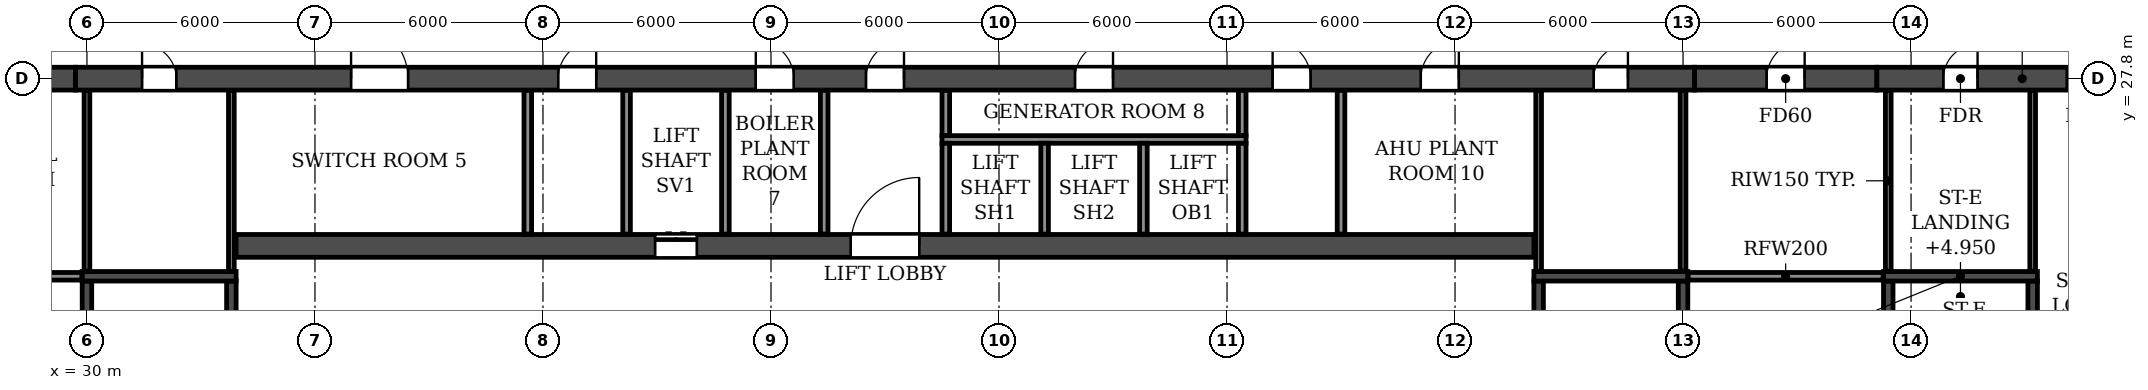
"""IFC4 building model, lengths in metres.
Left out: names, types, materials, properties, quantities, classifications, styles, units other than length and angle.
Written with IfcOpenShell. Run it as: python <this file> out.ifc"""

import sys

from ifc_helpers import new_model, si_unit, direction, frame, frame_2d, origin, place, context, subcontext, project, spatial, rectangle, extrude, element, fill, save


model = new_model("IFC4")
c1 = context("Model", 3, precision=1e-05, world=origin(), true_north=direction((0.0, 1.0)))
c2 = subcontext(c1, "Body", "Model", "MODEL_VIEW")
j1 = project(units=[si_unit("LENGTHUNIT", "METRE"), si_unit("PLANEANGLEUNIT", "RADIAN")], contexts=[c1])
p1 = place(None, origin())
s1 = spatial("IfcSite", under=j1, at=p1, CompositionType="ELEMENT")
p2 = place(p1, origin())
s2 = spatial("IfcBuilding", under=s1, at=p2, CompositionType="ELEMENT")
p3 = place(p2, frame((0.0, 0.0, 66.3)))
s3 = spatial("IfcBuildingStorey", under=s2, at=p3, CompositionType="ELEMENT", Elevation=66.3)
p4 = place(p3, frame((24.9, 27.8, 0.0), z_axis=(0.0, 0.0, 1.0), x_axis=(1.0, 0.0, 0.0)))
e1 = element("IfcWall", 1, at=p4, inside=s3, PredefinedType="SHEAR", context=c2, shape_type="SweptSolid", body=[
    extrude(rectangle(XDim=4.8, YDim=0.6, at=frame_2d((2.4, 0.0))), origin(), (0.0, 0.0, 1.0), 6.36),
])
p5 = place(p4, frame((1.9, 0.0, 0.0)))
e2 = element("IfcOpeningElement", 2, at=p5, cuts=e1, PredefinedType="OPENING", context=c2, shape_type="SweptSolid", body=[
    extrude(rectangle(XDim=1.0, YDim=2.1, at=frame_2d((0.5, 1.05))), frame((0.0, 0.31, 0.0), z_axis=(0.0, -1.0, 0.0), x_axis=(1.0, 0.0, 0.0)), (0.0, 0.0, 1.0), 0.62),
])
p6 = place(p3, frame((72.3, 27.8, 0.0), z_axis=(0.0, 0.0, 1.0), x_axis=(1.0, 0.0, 0.0)))
e3 = element("IfcWall", 3, at=p6, inside=s3, PredefinedType="SHEAR", context=c2, shape_type="SweptSolid", body=[
    extrude(rectangle(XDim=4.8, YDim=0.6, at=frame_2d((2.4, 0.0))), origin(), (0.0, 0.0, 1.0), 6.36),
])
p7 = place(p6, frame((1.9, 0.0, 0.0)))
e4 = element("IfcOpeningElement", 4, at=p7, cuts=e3, PredefinedType="OPENING", context=c2, shape_type="SweptSolid", body=[
    extrude(rectangle(XDim=1.0, YDim=2.1, at=frame_2d((0.5, 1.05))), frame((0.0, 0.31, 0.0), z_axis=(0.0, -1.0, 0.0), x_axis=(1.0, 0.0, 0.0)), (0.0, 0.0, 1.0), 0.62),
])
p8 = place(p3, frame((29.7, 27.8, 0.0), z_axis=(0.0, 0.0, 1.0), x_axis=(1.0, 0.0, 0.0)))
e5 = element("IfcWall", 5, at=p8, inside=s3, PredefinedType="SOLIDWALL", context=c2, shape_type="SweptSolid", body=[
    extrude(rectangle(XDim=42.6, YDim=0.6, at=frame_2d((21.3, 0.0))), origin(), (0.0, 0.0, 1.0), 6.36),
])
p9 = place(p8, frame((1.75, 0.0, 0.0)))
e6 = element("IfcOpeningElement", 6, at=p9, cuts=e5, PredefinedType="OPENING", context=c2, shape_type="SweptSolid", body=[
    extrude(rectangle(XDim=0.9, YDim=2.1, at=frame_2d((0.45, 1.05))), frame((0.0, 0.31, 0.0), z_axis=(0.0, -1.0, 0.0), x_axis=(1.0, 0.0, 0.0)), (0.0, 0.0, 1.0), 0.62),
])
p10 = place(p8, frame((7.25, 0.0, 0.0)))
e7 = element("IfcOpeningElement", 7, at=p10, cuts=e5, PredefinedType="OPENING", context=c2, shape_type="SweptSolid", body=[
    extrude(rectangle(XDim=1.5, YDim=2.1, at=frame_2d((0.75, 1.05))), frame((0.0, 0.31, 0.0), z_axis=(0.0, -1.0, 0.0), x_axis=(1.0, 0.0, 0.0)), (0.0, 0.0, 1.0), 0.62),
])
p11 = place(p8, frame((12.7, 0.0, 0.0)))
e8 = element("IfcOpeningElement", 8, at=p11, cuts=e5, PredefinedType="OPENING", context=c2, shape_type="SweptSolid", body=[
    extrude(rectangle(XDim=1.0, YDim=2.1, at=frame_2d((0.5, 1.05))), frame((0.0, 0.31, 0.0), z_axis=(0.0, -1.0, 0.0), x_axis=(1.0, 0.0, 0.0)), (0.0, 0.0, 1.0), 0.62),
])
p12 = place(p8, frame((17.9, 0.0, 0.0)))
e9 = element("IfcOpeningElement", 9, at=p12, cuts=e5, PredefinedType="OPENING", context=c2, shape_type="SweptSolid", body=[
    extrude(rectangle(XDim=1.0, YDim=2.1, at=frame_2d((0.5, 1.05))), frame((0.0, 0.31, 0.0), z_axis=(0.0, -1.0, 0.0), x_axis=(1.0, 0.0, 0.0)), (0.0, 0.0, 1.0), 0.62),
])
p13 = place(p8, frame((20.8, 0.0, 0.0)))
e10 = element("IfcOpeningElement", 10, at=p13, cuts=e5, PredefinedType="OPENING", context=c2, shape_type="SweptSolid", body=[
    extrude(rectangle(XDim=1.0, YDim=2.1, at=frame_2d((0.5, 1.05))), frame((0.0, 0.31, 0.0), z_axis=(0.0, -1.0, 0.0), x_axis=(1.0, 0.0, 0.0)), (0.0, 0.0, 1.0), 0.62),
])
p14 = place(p8, frame((26.3, 0.0, 0.0)))
e11 = element("IfcOpeningElement", 11, at=p14, cuts=e5, PredefinedType="OPENING", context=c2, shape_type="SweptSolid", body=[
    extrude(rectangle(XDim=1.0, YDim=2.1, at=frame_2d((0.5, 1.05))), frame((0.0, 0.31, 0.0), z_axis=(0.0, -1.0, 0.0), x_axis=(1.0, 0.0, 0.0)), (0.0, 0.0, 1.0), 0.62),
])
p15 = place(p8, frame((31.5, 0.0, 0.0)))
e12 = element("IfcOpeningElement", 12, at=p15, cuts=e5, PredefinedType="OPENING", context=c2, shape_type="SweptSolid", body=[
    extrude(rectangle(XDim=1.0, YDim=2.1, at=frame_2d((0.5, 1.05))), frame((0.0, 0.31, 0.0), z_axis=(0.0, -1.0, 0.0), x_axis=(1.0, 0.0, 0.0)), (0.0, 0.0, 1.0), 0.62),
])
p16 = place(p8, frame((35.4, 0.0, 0.0)))
e13 = element("IfcOpeningElement", 13, at=p16, cuts=e5, PredefinedType="OPENING", context=c2, shape_type="SweptSolid", body=[
    extrude(rectangle(XDim=1.0, YDim=2.1, at=frame_2d((0.5, 1.05))), frame((0.0, 0.31, 0.0), z_axis=(0.0, -1.0, 0.0), x_axis=(1.0, 0.0, 0.0)), (0.0, 0.0, 1.0), 0.62),
])
p17 = place(p8, frame((39.95, 0.0, 0.0)))
e14 = element("IfcOpeningElement", 14, at=p17, cuts=e5, PredefinedType="OPENING", context=c2, shape_type="SweptSolid", body=[
    extrude(rectangle(XDim=0.9, YDim=2.1, at=frame_2d((0.45, 1.05))), frame((0.0, 0.31, 0.0), z_axis=(0.0, -1.0, 0.0), x_axis=(1.0, 0.0, 0.0)), (0.0, 0.0, 1.0), 0.62),
])
p18 = place(p3, frame((77.1, 27.8, 0.0), z_axis=(0.0, 0.0, 1.0), x_axis=(1.0, 0.0, 0.0)))
e15 = element("IfcWall", 15, at=p18, inside=s3, PredefinedType="SOLIDWALL", context=c2, shape_type="SweptSolid", body=[
    extrude(rectangle(XDim=7.2, YDim=0.6, at=frame_2d((3.6, 0.0))), origin(), (0.0, 0.0, 1.0), 6.36),
])
p19 = place(p18, frame((1.75, 0.0, 0.0)))
e16 = element("IfcOpeningElement", 16, at=p19, cuts=e15, PredefinedType="OPENING", context=c2, shape_type="SweptSolid", body=[
    extrude(rectangle(XDim=0.9, YDim=2.1, at=frame_2d((0.45, 1.05))), frame((0.0, 0.31, 0.0), z_axis=(0.0, -1.0, 0.0), x_axis=(1.0, 0.0, 0.0)), (0.0, 0.0, 1.0), 0.62),
])
p20 = place(p18, frame((5.0, 0.0, 0.0)))
e17 = element("IfcOpeningElement", 17, at=p20, cuts=e15, PredefinedType="OPENING", context=c2, shape_type="SweptSolid", body=[
    extrude(rectangle(XDim=1.0, YDim=2.1, at=frame_2d((0.5, 1.05))), frame((0.0, 0.31, 0.0), z_axis=(0.0, -1.0, 0.0), x_axis=(1.0, 0.0, 0.0)), (0.0, 0.0, 1.0), 0.62),
])
p21 = place(p3, frame((33.925, 23.4, 0.0), z_axis=(0.0, 0.0, 1.0), x_axis=(1.0, 0.0, 0.0)))
e18 = element("IfcWall", 18, at=p21, inside=s3, PredefinedType="SOLIDWALL", context=c2, shape_type="SweptSolid", body=[
    extrude(rectangle(XDim=34.15, YDim=0.6, at=frame_2d((17.075, 0.0))), origin(), (0.0, 0.0, 1.0), 6.36),
])
p22 = place(p21, frame((16.175, 0.0, 0.0)))
e19 = element("IfcOpeningElement", 19, at=p22, cuts=e18, PredefinedType="OPENING", context=c2, shape_type="SweptSolid", body=[
    extrude(rectangle(XDim=1.8, YDim=2.1, at=frame_2d((0.9, 1.05))), frame((0.0, 0.31, 0.0), z_axis=(0.0, -1.0, 0.0), x_axis=(1.0, 0.0, 0.0)), (0.0, 0.0, 1.0), 0.62),
])
p23 = place(p21, frame((11.025, 0.0, 0.0)))
e20 = element("IfcOpeningElement", 20, at=p23, cuts=e18, PredefinedType="OPENING", context=c2, shape_type="SweptSolid", body=[
    extrude(rectangle(XDim=1.1, YDim=2.1, at=frame_2d((0.55, 1.05))), frame((0.0, 0.31, 0.0), z_axis=(0.0, -1.0, 0.0), x_axis=(1.0, 0.0, 0.0)), (0.0, 0.0, 1.0), 0.62),
])
p24 = place(p3, frame((30.0, 14.9, 0.0), z_axis=(0.0, 0.0, 1.0), x_axis=(0.0, 1.0, 0.0)))
e21 = element("IfcWall", 21, at=p24, inside=s3, PredefinedType="SOLIDWALL", context=c2, shape_type="SweptSolid", body=[
    extrude(rectangle(XDim=7.575, YDim=0.25, at=frame_2d((3.788, 0.0))), origin(), (0.0, 0.0, 1.0), 6.36),
])
p25 = place(p3, frame((33.8, 14.9, 0.0), z_axis=(0.0, 0.0, 1.0), x_axis=(0.0, 1.0, 0.0)))
e22 = element("IfcWall", 22, at=p25, inside=s3, PredefinedType="SOLIDWALL", context=c2, shape_type="SweptSolid", body=[
    extrude(rectangle(XDim=7.575, YDim=0.25, at=frame_2d((3.788, 0.0))), origin(), (0.0, 0.0, 1.0), 6.36),
])
p26 = place(p25, frame((0.4, 0.0, 0.0)))
e23 = element("IfcOpeningElement", 23, at=p26, cuts=e22, PredefinedType="OPENING", context=c2, shape_type="SweptSolid", body=[
    extrude(rectangle(XDim=1.0, YDim=2.1, at=frame_2d((0.5, 1.05))), frame((0.0, 0.135, 0.0), z_axis=(0.0, -1.0, 0.0), x_axis=(1.0, 0.0, 0.0)), (0.0, 0.0, 1.0), 0.27),
])
p27 = place(p3, frame((29.875, 22.6, 0.0), z_axis=(0.0, 0.0, 1.0), x_axis=(1.0, 0.0, 0.0)))
e24 = element("IfcWall", 24, at=p27, inside=s3, PredefinedType="SOLIDWALL", context=c2, shape_type="SweptSolid", body=[
    extrude(rectangle(XDim=4.05, YDim=0.25, at=frame_2d((2.025, 0.0))), origin(), (0.0, 0.0, 1.0), 6.36),
])
p28 = place(p3, frame((68.2, 14.9, 0.0), z_axis=(0.0, 0.0, 1.0), x_axis=(0.0, 1.0, 0.0)))
e25 = element("IfcWall", 25, at=p28, inside=s3, PredefinedType="SOLIDWALL", context=c2, shape_type="SweptSolid", body=[
    extrude(rectangle(XDim=7.575, YDim=0.25, at=frame_2d((3.788, 0.0))), origin(), (0.0, 0.0, 1.0), 6.36),
])
p29 = place(p28, frame((0.4, 0.0, 0.0)))
e26 = element("IfcOpeningElement", 26, at=p29, cuts=e25, PredefinedType="OPENING", context=c2, shape_type="SweptSolid", body=[
    extrude(rectangle(XDim=1.0, YDim=2.1, at=frame_2d((0.5, 1.05))), frame((0.0, 0.135, 0.0), z_axis=(0.0, -1.0, 0.0), x_axis=(1.0, 0.0, 0.0)), (0.0, 0.0, 1.0), 0.27),
])
p30 = place(p3, frame((72.0, 14.9, 0.0), z_axis=(0.0, 0.0, 1.0), x_axis=(0.0, 1.0, 0.0)))
e27 = element("IfcWall", 27, at=p30, inside=s3, PredefinedType="SOLIDWALL", context=c2, shape_type="SweptSolid", body=[
    extrude(rectangle(XDim=7.575, YDim=0.25, at=frame_2d((3.788, 0.0))), origin(), (0.0, 0.0, 1.0), 6.36),
])
p31 = place(p3, frame((68.075, 22.6, 0.0), z_axis=(0.0, 0.0, 1.0), x_axis=(1.0, 0.0, 0.0)))
e28 = element("IfcWall", 28, at=p31, inside=s3, PredefinedType="SOLIDWALL", context=c2, shape_type="SweptSolid", body=[
    extrude(rectangle(XDim=4.05, YDim=0.25, at=frame_2d((2.025, 0.0))), origin(), (0.0, 0.0, 1.0), 6.36),
])
p32 = place(p3, frame((77.4, 14.9, 0.0), z_axis=(0.0, 0.0, 1.0), x_axis=(0.0, 1.0, 0.0)))
e29 = element("IfcWall", 29, at=p32, inside=s3, PredefinedType="SOLIDWALL", context=c2, shape_type="SweptSolid", body=[
    extrude(rectangle(XDim=7.575, YDim=0.25, at=frame_2d((3.788, 0.0))), origin(), (0.0, 0.0, 1.0), 6.36),
])
p33 = place(p32, frame((0.4, 0.0, 0.0)))
e30 = element("IfcOpeningElement", 30, at=p33, cuts=e29, PredefinedType="OPENING", context=c2, shape_type="SweptSolid", body=[
    extrude(rectangle(XDim=1.0, YDim=2.1, at=frame_2d((0.5, 1.05))), frame((0.0, 0.135, 0.0), z_axis=(0.0, -1.0, 0.0), x_axis=(1.0, 0.0, 0.0)), (0.0, 0.0, 1.0), 0.27),
])
p34 = place(p3, frame((81.2, 14.9, 0.0), z_axis=(0.0, 0.0, 1.0), x_axis=(0.0, 1.0, 0.0)))
e31 = element("IfcWall", 31, at=p34, inside=s3, PredefinedType="SOLIDWALL", context=c2, shape_type="SweptSolid", body=[
    extrude(rectangle(XDim=7.575, YDim=0.25, at=frame_2d((3.788, 0.0))), origin(), (0.0, 0.0, 1.0), 6.36),
])
p35 = place(p34, frame((0.4, 0.0, 0.0)))
e32 = element("IfcOpeningElement", 32, at=p35, cuts=e31, PredefinedType="OPENING", context=c2, shape_type="SweptSolid", body=[
    extrude(rectangle(XDim=1.0, YDim=2.1, at=frame_2d((0.5, 1.05))), frame((0.0, 0.135, 0.0), z_axis=(0.0, -1.0, 0.0), x_axis=(1.0, 0.0, 0.0)), (0.0, 0.0, 1.0), 0.27),
])
p36 = place(p3, frame((77.275, 22.6, 0.0), z_axis=(0.0, 0.0, 1.0), x_axis=(1.0, 0.0, 0.0)))
e33 = element("IfcWall", 33, at=p36, inside=s3, PredefinedType="SOLIDWALL", context=c2, shape_type="SweptSolid", body=[
    extrude(rectangle(XDim=4.05, YDim=0.25, at=frame_2d((2.025, 0.0))), origin(), (0.0, 0.0, 1.0), 6.36),
])
for number, where, z_axis, x_axis in (
    (34, (41.6, 23.71, 0.0), (0.0, 0.0, 1.0), (0.0, 1.0, 0.0)),
    (35, (49.4, 23.71, 0.0), (0.0, 0.0, 1.0), (0.0, 1.0, 0.0)),
):
    element("IfcWall", number, at=place(p3, frame(where, z_axis=z_axis, x_axis=x_axis)), inside=s3, PredefinedType="PARTITIONING", context=c2, shape_type="SweptSolid", body=[
        extrude(rectangle(XDim=3.78, YDim=0.2, at=frame_2d((1.89, 0.0))), origin(), (0.0, 0.0, 1.0), 6.36),
    ])
for number, where, z_axis, x_axis in (
    (36, (52.6, 26.3, 0.0), (0.0, 0.0, 1.0), (0.0, 1.0, 0.0)),
    (37, (60.4, 26.3, 0.0), (0.0, 0.0, 1.0), (0.0, 1.0, 0.0)),
):
    element("IfcWall", number, at=place(p3, frame(where, z_axis=z_axis, x_axis=x_axis)), inside=s3, PredefinedType="PARTITIONING", context=c2, shape_type="SweptSolid", body=[
        extrude(rectangle(XDim=1.19, YDim=0.2, at=frame_2d((0.595, 0.0))), origin(), (0.0, 0.0, 1.0), 6.36),
    ])
p37 = place(p3, frame((63.0, 23.71, 0.0), z_axis=(0.0, 0.0, 1.0), x_axis=(0.0, 1.0, 0.0)))
e38 = element("IfcWall", 38, at=p37, inside=s3, PredefinedType="PARTITIONING", context=c2, shape_type="SweptSolid", body=[
    extrude(rectangle(XDim=3.78, YDim=0.2, at=frame_2d((1.89, 0.0))), origin(), (0.0, 0.0, 1.0), 6.36),
])
for number, where, z_axis, x_axis in (
    (39, (24.735, 22.6, 0.0), (0.0, 0.0, 1.0), (1.0, 0.0, 0.0)),
    (40, (72.135, 22.6, 0.0), (0.0, 0.0, 1.0), (1.0, 0.0, 0.0)),
):
    element("IfcWall", number, at=place(p3, frame(where, z_axis=z_axis, x_axis=x_axis)), inside=s3, PredefinedType="PARTITIONING", context=c2, shape_type="SweptSolid", body=[
        extrude(rectangle(XDim=5.13, YDim=0.2, at=frame_2d((2.565, 0.0))), origin(), (0.0, 0.0, 1.0), 6.36),
    ])
for number, where, z_axis, x_axis in (
    (41, (30.0, 22.735, 0.0), (0.0, 0.0, 1.0), (0.0, 1.0, 0.0)),
    (42, (33.8, 22.735, 0.0), (0.0, 0.0, 1.0), (0.0, 1.0, 0.0)),
    (43, (68.2, 22.735, 0.0), (0.0, 0.0, 1.0), (0.0, 1.0, 0.0)),
    (44, (72.0, 22.735, 0.0), (0.0, 0.0, 1.0), (0.0, 1.0, 0.0)),
    (45, (77.4, 22.735, 0.0), (0.0, 0.0, 1.0), (0.0, 1.0, 0.0)),
    (46, (81.2, 22.735, 0.0), (0.0, 0.0, 1.0), (0.0, 1.0, 0.0)),
):
    element("IfcWall", number, at=place(p3, frame(where, z_axis=z_axis, x_axis=x_axis)), inside=s3, PredefinedType="PARTITIONING", context=c2, shape_type="SweptSolid", body=[
        extrude(rectangle(XDim=4.755, YDim=0.15, at=frame_2d((2.377, 0.0))), origin(), (0.0, 0.0, 1.0), 6.36),
    ])
p38 = place(p3, frame((52.5, 26.2, 0.0), z_axis=(0.0, 0.0, 1.0), x_axis=(1.0, 0.0, 0.0)))
e47 = element("IfcWall", 47, at=p38, inside=s3, PredefinedType="PARTITIONING", context=c2, shape_type="SweptSolid", body=[
    extrude(rectangle(XDim=8.0, YDim=0.2, at=frame_2d((4.0, 0.0))), origin(), (0.0, 0.0, 1.0), 6.36),
])
for number, where, z_axis, x_axis in (
    (48, (44.2, 23.71, 0.0), (0.0, 0.0, 1.0), (0.0, 1.0, 0.0)),
    (49, (46.8, 23.71, 0.0), (0.0, 0.0, 1.0), (0.0, 1.0, 0.0)),
):
    element("IfcWall", number, at=place(p3, frame(where, z_axis=z_axis, x_axis=x_axis)), inside=s3, PredefinedType="PARTITIONING", context=c2, shape_type="SweptSolid", body=[
        extrude(rectangle(XDim=3.78, YDim=0.2, at=frame_2d((1.89, 0.0))), origin(), (0.0, 0.0, 1.0), 6.36),
    ])
for number, where, z_axis, x_axis in (
    (50, (52.6, 23.71, 0.0), (0.0, 0.0, 1.0), (0.0, 1.0, 0.0)),
    (51, (55.2, 23.71, 0.0), (0.0, 0.0, 1.0), (0.0, 1.0, 0.0)),
    (52, (57.8, 23.71, 0.0), (0.0, 0.0, 1.0), (0.0, 1.0, 0.0)),
    (53, (60.4, 23.71, 0.0), (0.0, 0.0, 1.0), (0.0, 1.0, 0.0)),
):
    element("IfcWall", number, at=place(p3, frame(where, z_axis=z_axis, x_axis=x_axis)), inside=s3, PredefinedType="PARTITIONING", context=c2, shape_type="SweptSolid", body=[
        extrude(rectangle(XDim=2.39, YDim=0.2, at=frame_2d((1.195, 0.0))), origin(), (0.0, 0.0, 1.0), 6.36),
    ])
p39 = place(p9, origin())
e54 = element("IfcDoor", 54, at=p39, inside=s3, OperationType="SINGLE_SWING_LEFT", PredefinedType="DOOR", context=c2, shape_type="SweptSolid", body=[
    extrude(rectangle(XDim=0.9, YDim=2.1, at=frame_2d((0.45, 1.05))), frame((0.0, 0.025, 0.0), z_axis=(0.0, -1.0, 0.0), x_axis=(1.0, 0.0, 0.0)), (0.0, 0.0, 1.0), 0.05),
])
fill(e6, e54)
p40 = place(p10, origin())
e55 = element("IfcDoor", 55, at=p40, inside=s3, OperationType="DOUBLE_DOOR_SINGLE_SWING", PredefinedType="DOOR", context=c2, shape_type="SweptSolid", body=[
    extrude(rectangle(XDim=1.5, YDim=2.1, at=frame_2d((0.75, 1.05))), frame((0.0, 0.025, 0.0), z_axis=(0.0, -1.0, 0.0), x_axis=(1.0, 0.0, 0.0)), (0.0, 0.0, 1.0), 0.05),
])
fill(e7, e55)
p41 = place(p11, origin())
e56 = element("IfcDoor", 56, at=p41, inside=s3, OperationType="SINGLE_SWING_RIGHT", PredefinedType="DOOR", context=c2, shape_type="SweptSolid", body=[
    extrude(rectangle(XDim=1.0, YDim=2.1, at=frame_2d((0.5, 1.05))), frame((0.0, 0.025, 0.0), z_axis=(0.0, -1.0, 0.0), x_axis=(1.0, 0.0, 0.0)), (0.0, 0.0, 1.0), 0.05),
])
fill(e8, e56)
p42 = place(p12, origin())
e57 = element("IfcDoor", 57, at=p42, inside=s3, OperationType="SINGLE_SWING_LEFT", PredefinedType="DOOR", context=c2, shape_type="SweptSolid", body=[
    extrude(rectangle(XDim=1.0, YDim=2.1, at=frame_2d((0.5, 1.05))), frame((0.0, 0.025, 0.0), z_axis=(0.0, -1.0, 0.0), x_axis=(1.0, 0.0, 0.0)), (0.0, 0.0, 1.0), 0.05),
])
fill(e9, e57)
p43 = place(p13, origin())
e58 = element("IfcDoor", 58, at=p43, inside=s3, OperationType="SINGLE_SWING_RIGHT", PredefinedType="DOOR", context=c2, shape_type="SweptSolid", body=[
    extrude(rectangle(XDim=1.0, YDim=2.1, at=frame_2d((0.5, 1.05))), frame((0.0, 0.025, 0.0), z_axis=(0.0, -1.0, 0.0), x_axis=(1.0, 0.0, 0.0)), (0.0, 0.0, 1.0), 0.05),
])
fill(e10, e58)
p44 = place(p14, origin())
e59 = element("IfcDoor", 59, at=p44, inside=s3, OperationType="SINGLE_SWING_RIGHT", PredefinedType="DOOR", context=c2, shape_type="SweptSolid", body=[
    extrude(rectangle(XDim=1.0, YDim=2.1, at=frame_2d((0.5, 1.05))), frame((0.0, 0.025, 0.0), z_axis=(0.0, -1.0, 0.0), x_axis=(1.0, 0.0, 0.0)), (0.0, 0.0, 1.0), 0.05),
])
fill(e11, e59)
p45 = place(p15, origin())
e60 = element("IfcDoor", 60, at=p45, inside=s3, OperationType="SINGLE_SWING_LEFT", PredefinedType="DOOR", context=c2, shape_type="SweptSolid", body=[
    extrude(rectangle(XDim=1.0, YDim=2.1, at=frame_2d((0.5, 1.05))), frame((0.0, 0.025, 0.0), z_axis=(0.0, -1.0, 0.0), x_axis=(1.0, 0.0, 0.0)), (0.0, 0.0, 1.0), 0.05),
])
fill(e12, e60)
p46 = place(p16, origin())
e61 = element("IfcDoor", 61, at=p46, inside=s3, OperationType="SINGLE_SWING_RIGHT", PredefinedType="DOOR", context=c2, shape_type="SweptSolid", body=[
    extrude(rectangle(XDim=1.0, YDim=2.1, at=frame_2d((0.5, 1.05))), frame((0.0, 0.025, 0.0), z_axis=(0.0, -1.0, 0.0), x_axis=(1.0, 0.0, 0.0)), (0.0, 0.0, 1.0), 0.05),
])
fill(e13, e61)
p47 = place(p17, origin())
e62 = element("IfcDoor", 62, at=p47, inside=s3, OperationType="SINGLE_SWING_RIGHT", PredefinedType="DOOR", context=c2, shape_type="SweptSolid", body=[
    extrude(rectangle(XDim=0.9, YDim=2.1, at=frame_2d((0.45, 1.05))), frame((0.0, 0.025, 0.0), z_axis=(0.0, -1.0, 0.0), x_axis=(1.0, 0.0, 0.0)), (0.0, 0.0, 1.0), 0.05),
])
fill(e14, e62)
p48 = place(p7, origin())
e63 = element("IfcDoor", 63, at=p48, inside=s3, OperationType="SINGLE_SWING_RIGHT", PredefinedType="DOOR", context=c2, shape_type="SweptSolid", body=[
    extrude(rectangle(XDim=1.0, YDim=2.1, at=frame_2d((0.5, 1.05))), frame((0.0, 0.025, 0.0), z_axis=(0.0, -1.0, 0.0), x_axis=(1.0, 0.0, 0.0)), (0.0, 0.0, 1.0), 0.05),
])
fill(e4, e63)
p49 = place(p19, origin())
e64 = element("IfcDoor", 64, at=p49, inside=s3, OperationType="SINGLE_SWING_RIGHT", PredefinedType="DOOR", context=c2, shape_type="SweptSolid", body=[
    extrude(rectangle(XDim=0.9, YDim=2.1, at=frame_2d((0.45, 1.05))), frame((0.0, 0.025, 0.0), z_axis=(0.0, -1.0, 0.0), x_axis=(1.0, 0.0, 0.0)), (0.0, 0.0, 1.0), 0.05),
])
fill(e16, e64)
p50 = place(p20, origin())
e65 = element("IfcDoor", 65, at=p50, inside=s3, OperationType="SINGLE_SWING_RIGHT", PredefinedType="DOOR", context=c2, shape_type="SweptSolid", body=[
    extrude(rectangle(XDim=1.0, YDim=2.1, at=frame_2d((0.5, 1.05))), frame((0.0, 0.025, 0.0), z_axis=(0.0, -1.0, 0.0), x_axis=(1.0, 0.0, 0.0)), (0.0, 0.0, 1.0), 0.05),
])
fill(e17, e65)
p51 = place(p22, origin())
e66 = element("IfcDoor", 66, at=p51, inside=s3, OperationType="DOUBLE_DOOR_SINGLE_SWING", PredefinedType="DOOR", context=c2, shape_type="SweptSolid", body=[
    extrude(rectangle(XDim=1.8, YDim=2.1, at=frame_2d((0.9, 1.05))), frame((0.0, 0.025, 0.0), z_axis=(0.0, -1.0, 0.0), x_axis=(1.0, 0.0, 0.0)), (0.0, 0.0, 1.0), 0.05),
])
fill(e19, e66)
p52 = place(p23, origin())
e67 = element("IfcDoor", 67, at=p52, inside=s3, OperationType="DOUBLE_DOOR_SLIDING", PredefinedType="DOOR", context=c2, shape_type="SweptSolid", body=[
    extrude(rectangle(XDim=1.1, YDim=2.1, at=frame_2d((0.55, 1.05))), frame((0.0, 0.025, 0.0), z_axis=(0.0, -1.0, 0.0), x_axis=(1.0, 0.0, 0.0)), (0.0, 0.0, 1.0), 0.05),
])
fill(e20, e67)
save(model, sys.argv[1])
